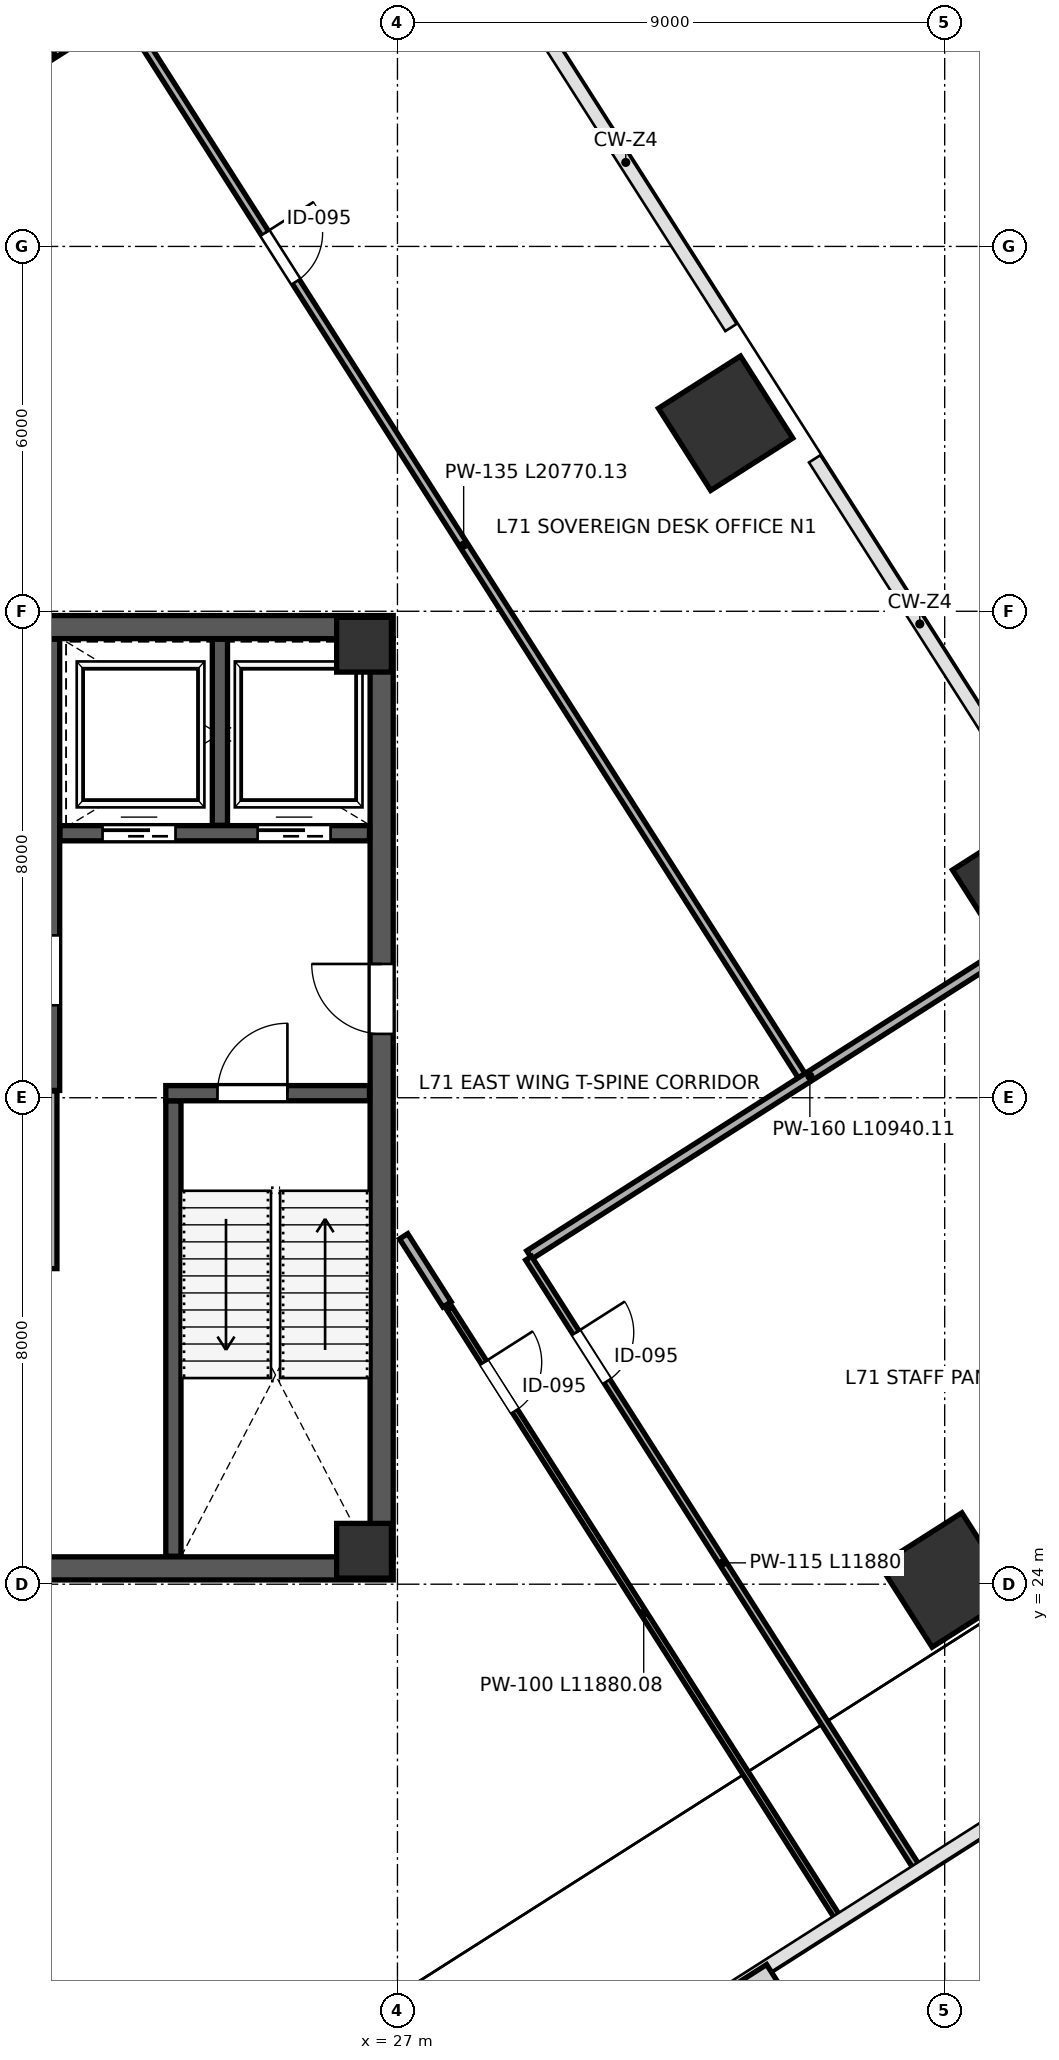
"""IFC4 building model, lengths in metres.
Left out: names, types, materials, properties, quantities, classifications, styles, units other than length and angle.
Written with IfcOpenShell. Run it as: python <this file> out.ifc"""

import sys

from ifc_helpers import new_model, si_unit, direction, frame, frame_2d, origin, origin_2d, place, context, subcontext, project, spatial, rectangle, extrude, source, transform, mapped, element, fill, save


model = new_model("IFC4")
c1 = context("Model", 3, precision=1e-05, world=origin(), true_north=direction((0.0, 1.0)))
c2 = subcontext(c1, "Body", "Model", "MODEL_VIEW")
j1 = project(units=[si_unit("LENGTHUNIT", "METRE"), si_unit("PLANEANGLEUNIT", "RADIAN")], contexts=[c1])
p1 = place(None, origin())
s1 = spatial("IfcSite", under=j1, at=p1, CompositionType="ELEMENT")
p2 = place(p1, origin())
s2 = spatial("IfcBuilding", under=s1, at=p2, CompositionType="ELEMENT")
p3 = place(p2, frame((0.0, 0.0, 315.6)))
s3 = spatial("IfcBuildingStorey", under=s2, at=p3, CompositionType="ELEMENT", Elevation=315.6)
m1 = source(origin(), c2, "Body", "SweptSolid", [
    extrude(rectangle(XDim=0.9, YDim=0.9, at=origin_2d()), origin(), (0.0, 0.0, 1.0), 4.198),
])
for number, where, z_axis, x_axis in (
    (1, (26.45, 24.55, 0.001), (0.0, 0.0, 1.0), (1.0, 0.0, 0.0)),
    (2, (26.45, 39.45, 0.001), (0.0, 0.0, 1.0), (1.0, 0.0, 0.0)),
):
    element("IfcColumn", number, at=place(p3, frame(where, z_axis=z_axis, x_axis=x_axis)), inside=s3, PredefinedType="COLUMN", context=c2, shape_type="MappedRepresentation", body=[
        mapped(m1, transform((0.0, 0.0, 0.0), scale=1.0)),
    ])
m2 = source(origin(), c2, "Body", "SweptSolid", [
    extrude(rectangle(XDim=1.6, YDim=1.6, at=origin_2d()), origin(), (0.0, 0.0, 1.0), 4.198),
])
for number, where, z_axis, x_axis in (
    (3, (32.397, 43.092, 0.001), (0.0, 0.0, 1.0), (-0.537, 0.843, 0.0)),
    (4, (37.232, 35.501, 0.001), (0.0, 0.0, 1.0), (-0.537, 0.843, 0.0)),
    (5, (36.038, 24.069, 0.001), (0.0, 0.0, 1.0), (-0.537, 0.843, 0.0)),
):
    element("IfcColumn", number, at=place(p3, frame(where, z_axis=z_axis, x_axis=x_axis)), inside=s3, PredefinedType="COLUMN", context=c2, shape_type="MappedRepresentation", body=[
        mapped(m2, transform((0.0, 0.0, 0.0), scale=1.0)),
    ])
p4 = place(p3, frame((26.74, 24.45, 0.0), z_axis=(0.0, 0.0, 1.0), x_axis=(0.0, 1.0, 0.0)))
e6 = element("IfcWall", 6, at=p4, inside=s3, PredefinedType="SHEAR", context=c2, shape_type="SweptSolid", body=[
    extrude(rectangle(XDim=15.1, YDim=0.38, at=frame_2d((7.55, 0.0))), origin(), (0.0, 0.0, 1.0), 3.96),
])
p5 = place(p4, frame((8.6, 0.0, 0.0)))
e7 = element("IfcOpeningElement", 7, at=p5, cuts=e6, PredefinedType="OPENING", context=c2, shape_type="SweptSolid", body=[
    extrude(rectangle(XDim=1.15, YDim=2.2, at=frame_2d((0.575, 1.1))), frame((0.0, 0.2, 0.0), z_axis=(0.0, -1.0, 0.0), x_axis=(1.0, 0.0, 0.0)), (0.0, 0.0, 1.0), 0.4),
])
for number, where, z_axis, x_axis in (
    (8, (9.07, 24.26, 0.0), (0.0, 0.0, 1.0), (1.0, 0.0, 0.0)),
    (9, (9.07, 39.74, 0.0), (0.0, 0.0, 1.0), (1.0, 0.0, 0.0)),
):
    element("IfcWall", number, at=place(p3, frame(where, z_axis=z_axis, x_axis=x_axis)), inside=s3, PredefinedType="SHEAR", context=c2, shape_type="SweptSolid", body=[
        extrude(rectangle(XDim=17.86, YDim=0.38, at=frame_2d((8.93, 0.0))), origin(), (0.0, 0.0, 1.0), 3.96),
    ])
p6 = place(p3, frame((23.315, 24.46, 0.0), z_axis=(0.0, 0.0, 1.0), x_axis=(0.0, 1.0, 0.0)))
e10 = element("IfcWall", 10, at=p6, inside=s3, PredefinedType="SHEAR", context=c2, shape_type="SweptSolid", body=[
    extrude(rectangle(XDim=7.49, YDim=0.25, at=frame_2d((3.745, 0.0))), origin(), (0.0, 0.0, 1.0), 3.96),
])
p7 = place(p3, frame((23.19, 32.075, 0.0), z_axis=(0.0, 0.0, 1.0), x_axis=(1.0, 0.0, 0.0)))
e11 = element("IfcWall", 11, at=p7, inside=s3, PredefinedType="SHEAR", context=c2, shape_type="SweptSolid", body=[
    extrude(rectangle(XDim=3.35, YDim=0.25, at=frame_2d((1.675, 0.0))), origin(), (0.0, 0.0, 1.0), 3.96),
])
p8 = place(p7, frame((0.85, 0.0, 0.0)))
e12 = element("IfcOpeningElement", 12, at=p8, cuts=e11, PredefinedType="OPENING", context=c2, shape_type="SweptSolid", body=[
    extrude(rectangle(XDim=1.15, YDim=2.2, at=frame_2d((0.575, 1.1))), frame((0.0, 0.135, 0.0), z_axis=(0.0, -1.0, 0.0), x_axis=(1.0, 0.0, 0.0)), (0.0, 0.0, 1.0), 0.27),
])
p9 = place(p3, frame((21.32, 32.12, 0.0), z_axis=(0.0, 0.0, 1.0), x_axis=(0.0, 1.0, 0.0)))
e13 = element("IfcWall", 13, at=p9, inside=s3, PredefinedType="SHEAR", context=c2, shape_type="SweptSolid", body=[
    extrude(rectangle(XDim=7.42, YDim=0.25, at=frame_2d((3.71, 0.0))), origin(), (0.0, 0.0, 1.0), 3.96),
])
p10 = place(p9, frame((1.4, 0.0, 0.0)))
e14 = element("IfcOpeningElement", 14, at=p10, cuts=e13, PredefinedType="OPENING", context=c2, shape_type="SweptSolid", body=[
    extrude(rectangle(XDim=1.15, YDim=2.2, at=frame_2d((0.575, 1.1))), frame((0.0, 0.135, 0.0), z_axis=(0.0, -1.0, 0.0), x_axis=(1.0, 0.0, 0.0)), (0.0, 0.0, 1.0), 0.27),
])
p11 = place(p3, frame((21.45, 36.35, 0.0), z_axis=(0.0, 0.0, 1.0), x_axis=(1.0, 0.0, 0.0)))
e15 = element("IfcWall", 15, at=p11, inside=s3, PredefinedType="SHEAR", context=c2, shape_type="SweptSolid", body=[
    extrude(rectangle(XDim=5.09, YDim=0.25, at=frame_2d((2.545, 0.0))), origin(), (0.0, 0.0, 1.0), 3.96),
])
p12 = place(p11, frame((0.7, 0.0, 0.0)))
e16 = element("IfcOpeningElement", 16, at=p12, cuts=e15, PredefinedType="OPENING", context=c2, shape_type="SweptSolid", body=[
    extrude(rectangle(XDim=1.2, YDim=2.2, at=frame_2d((0.6, 1.1))), frame((0.0, 0.135, 0.0), z_axis=(0.0, -1.0, 0.0), x_axis=(1.0, 0.0, 0.0)), (0.0, 0.0, 1.0), 0.27),
])
p13 = place(p11, frame((3.25, 0.0, 0.0)))
e17 = element("IfcOpeningElement", 17, at=p13, cuts=e15, PredefinedType="OPENING", context=c2, shape_type="SweptSolid", body=[
    extrude(rectangle(XDim=1.2, YDim=2.2, at=frame_2d((0.6, 1.1))), frame((0.0, 0.135, 0.0), z_axis=(0.0, -1.0, 0.0), x_axis=(1.0, 0.0, 0.0)), (0.0, 0.0, 1.0), 0.27),
])
p14 = place(p3, frame((24.08, 36.48, 0.0), z_axis=(0.0, 0.0, 1.0), x_axis=(0.0, 1.0, 0.0)))
e18 = element("IfcWall", 18, at=p14, inside=s3, PredefinedType="SHEAR", context=c2, shape_type="SweptSolid", body=[
    extrude(rectangle(XDim=3.06, YDim=0.25, at=frame_2d((1.53, 0.0))), origin(), (0.0, 0.0, 1.0), 3.96),
])
p15 = place(p3, frame((21.32, 29.19, 0.0), z_axis=(0.0, 0.0, 1.0), x_axis=(0.0, 1.0, 0.0)))
e19 = element("IfcWall", 19, at=p15, inside=s3, PredefinedType="PARTITIONING", context=c2, shape_type="SweptSolid", body=[
    extrude(rectangle(XDim=2.92, YDim=0.16, at=frame_2d((1.46, 0.0))), origin(), (0.0, 0.0, 1.0), 3.96),
])
p16 = place(p3, frame((27.102, 29.721, 0.0), z_axis=(0.0, 0.0, 1.0), x_axis=(0.537279676557, -0.843404143432, 0.0)))
e20 = element("IfcWall", 20, at=p16, inside=s3, PredefinedType="PARTITIONING", context=c2, shape_type="SweptSolid", body=[
    extrude(rectangle(XDim=1.329, YDim=0.16, at=frame_2d((0.664, 0.0))), origin(), (0.0, 0.0, 1.0), 3.96),
])
p17 = place(p3, frame((22.509, 49.847, 0.0), z_axis=(0.0, 0.0, 1.0), x_axis=(0.537290700932, -0.843397120396, 0.0)))
e21 = element("IfcWall", 21, at=p17, inside=s3, PredefinedType="PARTITIONING", context=c2, shape_type="SweptSolid", body=[
    extrude(rectangle(XDim=20.77, YDim=0.135, at=frame_2d((10.385, 0.0))), origin(), (0.0, 0.0, 1.0), 3.96),
])
p18 = place(p17, frame((4.3, 0.0, 0.0)))
e22 = element("IfcOpeningElement", 22, at=p18, cuts=e21, PredefinedType="OPENING", context=c2, shape_type="SweptSolid", body=[
    extrude(rectangle(XDim=0.95, YDim=2.15, at=frame_2d((0.475, 1.075))), frame((0.0, 0.078, 0.0), z_axis=(0.0, -1.0, 0.0), x_axis=(1.0, 0.0, 0.0)), (0.0, 0.0, 1.0), 0.155),
])
p19 = place(p3, frame((16.077, 45.797, 0.0), z_axis=(0.0, 0.0, 1.0), x_axis=(0.843392973199, 0.537297210824, 0.0)))
e23 = element("IfcWall", 23, at=p19, inside=s3, PredefinedType="PARTITIONING", context=c2, shape_type="SweptSolid", body=[
    extrude(rectangle(XDim=12.472, YDim=0.115, at=frame_2d((6.236, 0.0))), origin(), (0.0, 0.0, 1.0), 3.96),
])
p20 = place(p3, frame((29.169, 29.416, 0.0), z_axis=(0.0, 0.0, 1.0), x_axis=(0.843389386546, 0.537302840734, 0.0)))
e24 = element("IfcWall", 24, at=p20, inside=s3, PredefinedType="PARTITIONING", context=c2, shape_type="SweptSolid", body=[
    extrude(rectangle(XDim=10.94, YDim=0.16, at=frame_2d((5.47, 0.0))), origin(), (0.0, 0.0, 1.0), 3.96),
])
p21 = place(p3, frame((29.157, 29.361, 0.0), z_axis=(0.0, 0.0, 1.0), x_axis=(0.537294294715, -0.843394830946, 0.0)))
e25 = element("IfcWall", 25, at=p21, inside=s3, PredefinedType="PARTITIONING", context=c2, shape_type="SweptSolid", body=[
    extrude(rectangle(XDim=11.88, YDim=0.115, at=frame_2d((5.94, 0.0))), origin(), (0.0, 0.0, 1.0), 3.96),
])
p22 = place(p21, frame((1.45, 0.0, 0.0)))
e26 = element("IfcOpeningElement", 26, at=p22, cuts=e25, PredefinedType="OPENING", context=c2, shape_type="SweptSolid", body=[
    extrude(rectangle(XDim=0.95, YDim=2.15, at=frame_2d((0.475, 1.075))), frame((0.0, 0.067, 0.0), z_axis=(0.0, -1.0, 0.0), x_axis=(1.0, 0.0, 0.0)), (0.0, 0.0, 1.0), 0.135),
])
p23 = place(p3, frame((27.858, 28.533, 0.0), z_axis=(0.0, 0.0, 1.0), x_axis=(0.537294294715, -0.843394830946, 0.0)))
e27 = element("IfcWall", 27, at=p23, inside=s3, PredefinedType="PARTITIONING", context=c2, shape_type="SweptSolid", body=[
    extrude(rectangle(XDim=11.88, YDim=0.1, at=frame_2d((5.94, 0.0))), origin(), (0.0, 0.0, 1.0), 3.96),
])
p24 = place(p23, frame((1.05, 0.0, 0.0)))
e28 = element("IfcOpeningElement", 28, at=p24, cuts=e27, PredefinedType="OPENING", context=c2, shape_type="SweptSolid", body=[
    extrude(rectangle(XDim=0.95, YDim=2.15, at=frame_2d((0.475, 1.075))), frame((0.0, 0.06, 0.0), z_axis=(0.0, -1.0, 0.0), x_axis=(1.0, 0.0, 0.0)), (0.0, 0.0, 1.0), 0.12),
])
m3 = source(origin(), c2, "Body", "SweptSolid", [
    extrude(rectangle(XDim=1.15, YDim=2.2, at=frame_2d((0.575, 1.1))), frame((0.0, 0.025, 0.0), z_axis=(0.0, -1.0, 0.0), x_axis=(1.0, 0.0, 0.0)), (0.0, 0.0, 1.0), 0.05),
])
p25 = place(p10, origin())
e29 = element("IfcDoor", 29, at=p25, inside=s3, OperationType="SINGLE_SWING_LEFT", PredefinedType="DOOR", context=c2, shape_type="MappedRepresentation", body=[
    mapped(m3, transform((0.0, 0.0, 0.0), scale=1.0)),
])
fill(e14, e29)
m4 = source(origin(), c2, "Body", "SweptSolid", [
    extrude(rectangle(XDim=1.15, YDim=2.2, at=frame_2d((0.575, 1.1))), frame((0.0, 0.025, 0.0), z_axis=(0.0, -1.0, 0.0), x_axis=(1.0, 0.0, 0.0)), (0.0, 0.0, 1.0), 0.05),
])
p26 = place(p8, origin())
e30 = element("IfcDoor", 30, at=p26, inside=s3, OperationType="SINGLE_SWING_RIGHT", PredefinedType="DOOR", context=c2, shape_type="MappedRepresentation", body=[
    mapped(m4, transform((0.0, 0.0, 0.0), scale=1.0)),
])
fill(e12, e30)
p27 = place(p5, origin())
e31 = element("IfcDoor", 31, at=p27, inside=s3, OperationType="SINGLE_SWING_RIGHT", PredefinedType="DOOR", context=c2, shape_type="MappedRepresentation", body=[
    mapped(m3, transform((0.0, 0.0, 0.0), scale=1.0)),
])
fill(e7, e31)
m5 = source(origin(), c2, "Body", "SweptSolid", [
    extrude(rectangle(XDim=1.2, YDim=2.2, at=frame_2d((0.6, 1.1))), frame((0.0, 0.025, 0.0), z_axis=(0.0, -1.0, 0.0), x_axis=(1.0, 0.0, 0.0)), (0.0, 0.0, 1.0), 0.05),
])
p28 = place(p12, origin())
e32 = element("IfcDoor", 32, at=p28, inside=s3, OperationType="SLIDING_TO_LEFT", PredefinedType="DOOR", context=c2, shape_type="MappedRepresentation", body=[
    mapped(m5, transform((0.0, 0.0, 0.0), scale=1.0)),
])
fill(e16, e32)
p29 = place(p13, origin())
e33 = element("IfcDoor", 33, at=p29, inside=s3, OperationType="SLIDING_TO_RIGHT", PredefinedType="DOOR", context=c2, shape_type="MappedRepresentation", body=[
    mapped(m5, transform((0.0, 0.0, 0.0), scale=1.0)),
])
fill(e17, e33)
m6 = source(origin(), c2, "Body", "SweptSolid", [
    extrude(rectangle(XDim=0.95, YDim=2.15, at=frame_2d((0.475, 1.075))), frame((0.0, 0.025, 0.0), z_axis=(0.0, -1.0, 0.0), x_axis=(1.0, 0.0, 0.0)), (0.0, 0.0, 1.0), 0.05),
])
p30 = place(p18, origin())
e34 = element("IfcDoor", 34, at=p30, inside=s3, OperationType="SINGLE_SWING_LEFT", PredefinedType="DOOR", context=c2, shape_type="MappedRepresentation", body=[
    mapped(m6, transform((0.0, 0.0, 0.0), scale=1.0)),
])
fill(e22, e34)
p31 = place(p22, origin())
e35 = element("IfcDoor", 35, at=p31, inside=s3, OperationType="SINGLE_SWING_LEFT", PredefinedType="DOOR", context=c2, shape_type="MappedRepresentation", body=[
    mapped(m6, transform((0.0, 0.0, 0.0), scale=1.0)),
])
fill(e26, e35)
p32 = place(p24, origin())
e36 = element("IfcDoor", 36, at=p32, inside=s3, OperationType="SINGLE_SWING_LEFT", PredefinedType="DOOR", context=c2, shape_type="MappedRepresentation", body=[
    mapped(m6, transform((0.0, 0.0, 0.0), scale=1.0)),
])
fill(e28, e36)
save(model, sys.argv[1])
